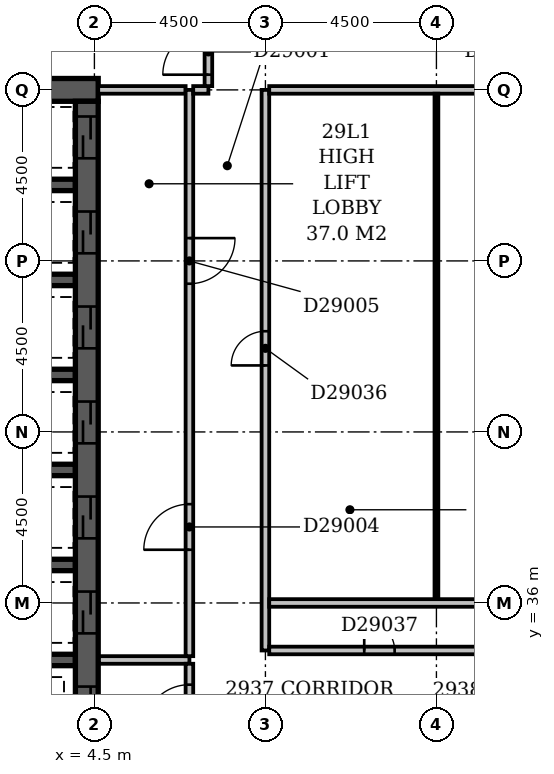
"""IFC4 building model, lengths in metres.
Left out: names, types, materials, properties, quantities, classifications, styles, units other than length and angle.
Written with IfcOpenShell. Run it as: python <this file> out.ifc"""

import sys

from ifc_helpers import new_model, si_unit, direction, frame, frame_2d, origin, place, context, subcontext, project, spatial, rectangle, extrude, element, fill, save


model = new_model("IFC4")
c1 = context("Model", 3, precision=1e-05, world=origin(), true_north=direction((0.0, 1.0)))
c2 = subcontext(c1, "Body", "Model", "MODEL_VIEW")
j1 = project(units=[si_unit("LENGTHUNIT", "METRE"), si_unit("PLANEANGLEUNIT", "RADIAN")], contexts=[c1])
p1 = place(None, origin())
s1 = spatial("IfcSite", under=j1, at=p1, CompositionType="ELEMENT")
p2 = place(p1, origin())
s2 = spatial("IfcBuilding", under=s1, at=p2, CompositionType="ELEMENT")
p3 = place(p2, frame((0.0, 0.0, 119.6)))
s3 = spatial("IfcBuildingStorey", under=s2, at=p3, CompositionType="ELEMENT", Elevation=119.6)
p4 = place(p3, frame((0.2, 49.5, -0.3), z_axis=(0.0, 0.0, 1.0), x_axis=(1.0, 0.0, 0.0)))
e1 = element("IfcWall", 1, at=p4, inside=s3, PredefinedType="SHEAR", context=c2, shape_type="SweptSolid", body=[
    extrude(rectangle(XDim=4.4, YDim=0.6, at=frame_2d((2.2, 0.0))), origin(), (0.0, 0.0, 1.0), 3.6),
])
for number, where, z_axis, x_axis in (
    (2, (0.8, 34.5, -0.3), (0.0, 0.0, 1.0), (1.0, 0.0, 0.0)),
    (3, (0.8, 37.0, -0.3), (0.0, 0.0, 1.0), (1.0, 0.0, 0.0)),
    (4, (0.8, 39.5, -0.3), (0.0, 0.0, 1.0), (1.0, 0.0, 0.0)),
    (5, (0.8, 42.0, -0.3), (0.0, 0.0, 1.0), (1.0, 0.0, 0.0)),
    (6, (0.8, 44.5, -0.3), (0.0, 0.0, 1.0), (1.0, 0.0, 0.0)),
    (7, (0.8, 47.0, -0.3), (0.0, 0.0, 1.0), (1.0, 0.0, 0.0)),
):
    element("IfcWall", number, at=place(p3, frame(where, z_axis=z_axis, x_axis=x_axis)), inside=s3, PredefinedType="SHEAR", context=c2, shape_type="SweptSolid", body=[
        extrude(rectangle(XDim=3.2, YDim=0.3, at=frame_2d((1.6, 0.0))), origin(), (0.0, 0.0, 1.0), 3.6),
    ])
p5 = place(p3, frame((4.3, 27.15, -0.3), z_axis=(0.0, 0.0, 1.0), x_axis=(0.0, 1.0, 0.0)))
e8 = element("IfcWall", 8, at=p5, inside=s3, PredefinedType="SHEAR", context=c2, shape_type="SweptSolid", body=[
    extrude(rectangle(XDim=22.05, YDim=0.6, at=frame_2d((11.025, 0.0))), origin(), (0.0, 0.0, 1.0), 3.6),
])
p6 = place(p5, frame((3.05, 0.0, 0.3)))
e9 = element("IfcOpeningElement", 9, at=p6, cuts=e8, PredefinedType="OPENING", context=c2, shape_type="SweptSolid", body=[
    extrude(rectangle(XDim=1.1, YDim=2.1, at=frame_2d((0.55, 1.05))), frame((0.0, 0.312, 0.0), z_axis=(0.0, -1.0, 0.0), x_axis=(1.0, 0.0, 0.0)), (0.0, 0.0, 1.0), 0.624),
])
p7 = place(p5, frame((0.55, 0.0, 0.3)))
e10 = element("IfcOpeningElement", 10, at=p7, cuts=e8, PredefinedType="OPENING", context=c2, shape_type="SweptSolid", body=[
    extrude(rectangle(XDim=1.1, YDim=2.1, at=frame_2d((0.55, 1.05))), frame((0.0, 0.312, 0.0), z_axis=(0.0, -1.0, 0.0), x_axis=(1.0, 0.0, 0.0)), (0.0, 0.0, 1.0), 0.624),
])
p8 = place(p5, frame((20.55, 0.0, 0.3)))
e11 = element("IfcOpeningElement", 11, at=p8, cuts=e8, PredefinedType="OPENING", context=c2, shape_type="SweptSolid", body=[
    extrude(rectangle(XDim=1.1, YDim=2.1, at=frame_2d((0.55, 1.05))), frame((0.0, 0.312, 0.0), z_axis=(0.0, -1.0, 0.0), x_axis=(1.0, 0.0, 0.0)), (0.0, 0.0, 1.0), 0.624),
])
p9 = place(p5, frame((18.05, 0.0, 0.3)))
e12 = element("IfcOpeningElement", 12, at=p9, cuts=e8, PredefinedType="OPENING", context=c2, shape_type="SweptSolid", body=[
    extrude(rectangle(XDim=1.1, YDim=2.1, at=frame_2d((0.55, 1.05))), frame((0.0, 0.312, 0.0), z_axis=(0.0, -1.0, 0.0), x_axis=(1.0, 0.0, 0.0)), (0.0, 0.0, 1.0), 0.624),
])
p10 = place(p5, frame((15.55, 0.0, 0.3)))
e13 = element("IfcOpeningElement", 13, at=p10, cuts=e8, PredefinedType="OPENING", context=c2, shape_type="SweptSolid", body=[
    extrude(rectangle(XDim=1.1, YDim=2.1, at=frame_2d((0.55, 1.05))), frame((0.0, 0.312, 0.0), z_axis=(0.0, -1.0, 0.0), x_axis=(1.0, 0.0, 0.0)), (0.0, 0.0, 1.0), 0.624),
])
p11 = place(p5, frame((13.05, 0.0, 0.3)))
e14 = element("IfcOpeningElement", 14, at=p11, cuts=e8, PredefinedType="OPENING", context=c2, shape_type="SweptSolid", body=[
    extrude(rectangle(XDim=1.1, YDim=2.1, at=frame_2d((0.55, 1.05))), frame((0.0, 0.312, 0.0), z_axis=(0.0, -1.0, 0.0), x_axis=(1.0, 0.0, 0.0)), (0.0, 0.0, 1.0), 0.624),
])
p12 = place(p5, frame((10.55, 0.0, 0.3)))
e15 = element("IfcOpeningElement", 15, at=p12, cuts=e8, PredefinedType="OPENING", context=c2, shape_type="SweptSolid", body=[
    extrude(rectangle(XDim=1.1, YDim=2.1, at=frame_2d((0.55, 1.05))), frame((0.0, 0.312, 0.0), z_axis=(0.0, -1.0, 0.0), x_axis=(1.0, 0.0, 0.0)), (0.0, 0.0, 1.0), 0.624),
])
p13 = place(p5, frame((8.05, 0.0, 0.3)))
e16 = element("IfcOpeningElement", 16, at=p13, cuts=e8, PredefinedType="OPENING", context=c2, shape_type="SweptSolid", body=[
    extrude(rectangle(XDim=1.1, YDim=2.1, at=frame_2d((0.55, 1.05))), frame((0.0, 0.312, 0.0), z_axis=(0.0, -1.0, 0.0), x_axis=(1.0, 0.0, 0.0)), (0.0, 0.0, 1.0), 0.624),
])
p14 = place(p5, frame((5.55, 0.0, 0.3)))
e17 = element("IfcOpeningElement", 17, at=p14, cuts=e8, PredefinedType="OPENING", context=c2, shape_type="SweptSolid", body=[
    extrude(rectangle(XDim=1.1, YDim=2.1, at=frame_2d((0.55, 1.05))), frame((0.0, 0.312, 0.0), z_axis=(0.0, -1.0, 0.0), x_axis=(1.0, 0.0, 0.0)), (0.0, 0.0, 1.0), 0.624),
])
p15 = place(p3, frame((4.62, 34.5, 0.0), z_axis=(0.0, 0.0, 1.0), x_axis=(1.0, 0.0, 0.0)))
e18 = element("IfcWall", 18, at=p15, inside=s3, PredefinedType="PARTITIONING", context=c2, shape_type="SweptSolid", body=[
    extrude(rectangle(XDim=2.38, YDim=0.2, at=frame_2d((1.19, 0.0))), origin(), (0.0, 0.0, 1.0), 3.3),
])
p16 = place(p3, frame((7.0, 34.6, 0.0), z_axis=(0.0, 0.0, 1.0), x_axis=(0.0, 1.0, 0.0)))
e19 = element("IfcWall", 19, at=p16, inside=s3, PredefinedType="PARTITIONING", context=c2, shape_type="SweptSolid", body=[
    extrude(rectangle(XDim=14.9, YDim=0.2, at=frame_2d((7.45, 0.0))), origin(), (0.0, 0.0, 1.0), 3.3),
])
p17 = place(p16, frame((2.8, 0.0, 0.0)))
e20 = element("IfcOpeningElement", 20, at=p17, cuts=e19, PredefinedType="OPENING", context=c2, shape_type="SweptSolid", body=[
    extrude(rectangle(XDim=1.2, YDim=2.1, at=frame_2d((0.6, 1.05))), frame((0.0, 0.112, 0.0), z_axis=(0.0, -1.0, 0.0), x_axis=(1.0, 0.0, 0.0)), (0.0, 0.0, 1.0), 0.224),
])
p18 = place(p16, frame((9.8, 0.0, 0.0)))
e21 = element("IfcOpeningElement", 21, at=p18, cuts=e19, PredefinedType="OPENING", context=c2, shape_type="SweptSolid", body=[
    extrude(rectangle(XDim=1.2, YDim=2.1, at=frame_2d((0.6, 1.05))), frame((0.0, 0.112, 0.0), z_axis=(0.0, -1.0, 0.0), x_axis=(1.0, 0.0, 0.0)), (0.0, 0.0, 1.0), 0.224),
])
p19 = place(p3, frame((4.6, 49.5, 0.0), z_axis=(0.0, 0.0, 1.0), x_axis=(1.0, 0.0, 0.0)))
e22 = element("IfcWall", 22, at=p19, inside=s3, PredefinedType="PARTITIONING", context=c2, shape_type="SweptSolid", body=[
    extrude(rectangle(XDim=2.3, YDim=0.2, at=frame_2d((1.15, 0.0))), origin(), (0.0, 0.0, 1.0), 3.3),
])
p20 = place(p3, frame((7.0, 32.1, 0.0), z_axis=(0.0, 0.0, 1.0), x_axis=(0.0, 1.0, 0.0)))
e23 = element("IfcWall", 23, at=p20, inside=s3, PredefinedType="PARTITIONING", context=c2, shape_type="SweptSolid", body=[
    extrude(rectangle(XDim=2.3, YDim=0.2, at=frame_2d((1.15, 0.0))), origin(), (0.0, 0.0, 1.0), 3.3),
])
p21 = place(p20, frame((0.55, 0.0, 0.0)))
e24 = element("IfcOpeningElement", 24, at=p21, cuts=e23, PredefinedType="OPENING", context=c2, shape_type="SweptSolid", body=[
    extrude(rectangle(XDim=1.2, YDim=2.1, at=frame_2d((0.6, 1.05))), frame((0.0, 0.112, 0.0), z_axis=(0.0, -1.0, 0.0), x_axis=(1.0, 0.0, 0.0)), (0.0, 0.0, 1.0), 0.224),
])
p22 = place(p3, frame((7.1, 49.5, 0.0), z_axis=(0.0, 0.0, 1.0), x_axis=(1.0, 0.0, 0.0)))
e25 = element("IfcWall", 25, at=p22, inside=s3, PredefinedType="PARTITIONING", context=c2, shape_type="SweptSolid", body=[
    extrude(rectangle(XDim=0.4, YDim=0.2, at=frame_2d((0.2, 0.0))), origin(), (0.0, 0.0, 1.0), 3.3),
])
p23 = place(p3, frame((7.5, 49.6, 0.0), z_axis=(0.0, 0.0, 1.0), x_axis=(0.0, 1.0, 0.0)))
e26 = element("IfcWall", 26, at=p23, inside=s3, PredefinedType="PARTITIONING", context=c2, shape_type="SweptSolid", body=[
    extrude(rectangle(XDim=3.9, YDim=0.2, at=frame_2d((1.95, 0.0))), origin(), (0.0, 0.0, 1.0), 3.3),
])
p24 = place(p23, frame((0.3, 0.0, 0.0)))
e27 = element("IfcOpeningElement", 27, at=p24, cuts=e26, PredefinedType="OPENING", context=c2, shape_type="SweptSolid", body=[
    extrude(rectangle(XDim=1.2, YDim=2.1, at=frame_2d((0.6, 1.05))), frame((0.0, 0.112, 0.0), z_axis=(0.0, -1.0, 0.0), x_axis=(1.0, 0.0, 0.0)), (0.0, 0.0, 1.0), 0.224),
])
p25 = place(p3, frame((9.0, 34.75, 0.0), z_axis=(0.0, 0.0, 1.0), x_axis=(0.0, 1.0, 0.0)))
e28 = element("IfcWall", 28, at=p25, inside=s3, PredefinedType="PARTITIONING", context=c2, shape_type="SweptSolid", body=[
    extrude(rectangle(XDim=14.75, YDim=0.2, at=frame_2d((7.375, 0.0))), origin(), (0.0, 0.0, 1.0), 3.3),
])
p26 = place(p25, frame((7.5, 0.0, 0.0)))
e29 = element("IfcOpeningElement", 29, at=p26, cuts=e28, PredefinedType="OPENING", context=c2, shape_type="SweptSolid", body=[
    extrude(rectangle(XDim=0.9, YDim=2.1, at=frame_2d((0.45, 1.05))), frame((0.0, 0.112, 0.0), z_axis=(0.0, -1.0, 0.0), x_axis=(1.0, 0.0, 0.0)), (0.0, 0.0, 1.0), 0.224),
])
p27 = place(p3, frame((9.1, 34.75, 0.0), z_axis=(0.0, 0.0, 1.0), x_axis=(1.0, 0.0, 0.0)))
e30 = element("IfcWall", 30, at=p27, inside=s3, PredefinedType="PARTITIONING", context=c2, shape_type="SweptSolid", body=[
    extrude(rectangle(XDim=8.85, YDim=0.2, at=frame_2d((4.425, 0.0))), origin(), (0.0, 0.0, 1.0), 3.3),
])
p28 = place(p27, frame((2.5, 0.0, 0.0)))
e31 = element("IfcOpeningElement", 31, at=p28, cuts=e30, PredefinedType="OPENING", context=c2, shape_type="SweptSolid", body=[
    extrude(rectangle(XDim=0.8, YDim=2.1, at=frame_2d((0.4, 1.05))), frame((0.0, 0.112, 0.0), z_axis=(0.0, -1.0, 0.0), x_axis=(1.0, 0.0, 0.0)), (0.0, 0.0, 1.0), 0.224),
])
p29 = place(p3, frame((9.1, 36.0, 0.0), z_axis=(0.0, 0.0, 1.0), x_axis=(1.0, 0.0, 0.0)))
e32 = element("IfcWall", 32, at=p29, inside=s3, PredefinedType="PARTITIONING", context=c2, shape_type="SweptSolid", body=[
    extrude(rectangle(XDim=12.9, YDim=0.2, at=frame_2d((6.45, 0.0))), origin(), (0.0, 0.0, 1.0), 3.3),
])
p30 = place(p3, frame((13.5, 36.1, 0.0), z_axis=(0.0, 0.0, 1.0), x_axis=(0.0, 1.0, 0.0)))
e33 = element("IfcWall", 33, at=p30, inside=s3, PredefinedType="PARTITIONING", context=c2, shape_type="SweptSolid", body=[
    extrude(rectangle(XDim=13.3, YDim=0.1, at=frame_2d((6.65, 0.0))), origin(), (0.0, 0.0, 1.0), 3.3),
])
p31 = place(p3, frame((9.1, 49.5, 0.0), z_axis=(0.0, 0.0, 1.0), x_axis=(1.0, 0.0, 0.0)))
e34 = element("IfcWall", 34, at=p31, inside=s3, PredefinedType="PARTITIONING", context=c2, shape_type="SweptSolid", body=[
    extrude(rectangle(XDim=41.55, YDim=0.2, at=frame_2d((20.775, 0.0))), origin(), (0.0, 0.0, 1.0), 3.3),
])
p32 = place(p31, frame((13.7, 0.0, 0.0)))
e35 = element("IfcOpeningElement", 35, at=p32, cuts=e34, PredefinedType="OPENING", context=c2, shape_type="SweptSolid", body=[
    extrude(rectangle(XDim=1.0, YDim=2.1, at=frame_2d((0.5, 1.05))), frame((0.0, 0.112, 0.0), z_axis=(0.0, -1.0, 0.0), x_axis=(1.0, 0.0, 0.0)), (0.0, 0.0, 1.0), 0.224),
])
p33 = place(p31, frame((27.8, 0.0, 0.0)))
e36 = element("IfcOpeningElement", 36, at=p33, cuts=e34, PredefinedType="OPENING", context=c2, shape_type="SweptSolid", body=[
    extrude(rectangle(XDim=1.0, YDim=2.1, at=frame_2d((0.5, 1.05))), frame((0.0, 0.112, 0.0), z_axis=(0.0, -1.0, 0.0), x_axis=(1.0, 0.0, 0.0)), (0.0, 0.0, 1.0), 0.224),
])
p34 = place(p31, frame((8.4, 0.0, 0.0)))
e37 = element("IfcOpeningElement", 37, at=p34, cuts=e34, PredefinedType="OPENING", context=c2, shape_type="SweptSolid", body=[
    extrude(rectangle(XDim=0.9, YDim=2.1, at=frame_2d((0.45, 1.05))), frame((0.0, 0.112, 0.0), z_axis=(0.0, -1.0, 0.0), x_axis=(1.0, 0.0, 0.0)), (0.0, 0.0, 1.0), 0.224),
])
p35 = place(p24, origin())
e38 = element("IfcDoor", 38, at=p35, inside=s3, OperationType="SINGLE_SWING_LEFT", PredefinedType="DOOR", context=c2, shape_type="SweptSolid", body=[
    extrude(rectangle(XDim=1.2, YDim=2.1, at=frame_2d((0.6, 1.05))), frame((0.0, 0.025, 0.0), z_axis=(0.0, -1.0, 0.0), x_axis=(1.0, 0.0, 0.0)), (0.0, 0.0, 1.0), 0.05),
])
fill(e27, e38)
p36 = place(p8, origin())
e39 = element("IfcDoor", 39, at=p36, inside=s3, OperationType="SLIDING_TO_LEFT", PredefinedType="DOOR", context=c2, shape_type="SweptSolid", body=[
    extrude(rectangle(XDim=1.1, YDim=2.1, at=frame_2d((0.55, 1.05))), frame((0.0, 0.025, 0.0), z_axis=(0.0, -1.0, 0.0), x_axis=(1.0, 0.0, 0.0)), (0.0, 0.0, 1.0), 0.05),
])
fill(e11, e39)
p37 = place(p9, origin())
e40 = element("IfcDoor", 40, at=p37, inside=s3, OperationType="SLIDING_TO_LEFT", PredefinedType="DOOR", context=c2, shape_type="SweptSolid", body=[
    extrude(rectangle(XDim=1.1, YDim=2.1, at=frame_2d((0.55, 1.05))), frame((0.0, 0.025, 0.0), z_axis=(0.0, -1.0, 0.0), x_axis=(1.0, 0.0, 0.0)), (0.0, 0.0, 1.0), 0.05),
])
fill(e12, e40)
p38 = place(p10, origin())
e41 = element("IfcDoor", 41, at=p38, inside=s3, OperationType="SLIDING_TO_LEFT", PredefinedType="DOOR", context=c2, shape_type="SweptSolid", body=[
    extrude(rectangle(XDim=1.1, YDim=2.1, at=frame_2d((0.55, 1.05))), frame((0.0, 0.025, 0.0), z_axis=(0.0, -1.0, 0.0), x_axis=(1.0, 0.0, 0.0)), (0.0, 0.0, 1.0), 0.05),
])
fill(e13, e41)
p39 = place(p11, origin())
e42 = element("IfcDoor", 42, at=p39, inside=s3, OperationType="SLIDING_TO_LEFT", PredefinedType="DOOR", context=c2, shape_type="SweptSolid", body=[
    extrude(rectangle(XDim=1.1, YDim=2.1, at=frame_2d((0.55, 1.05))), frame((0.0, 0.025, 0.0), z_axis=(0.0, -1.0, 0.0), x_axis=(1.0, 0.0, 0.0)), (0.0, 0.0, 1.0), 0.05),
])
fill(e14, e42)
p40 = place(p12, origin())
e43 = element("IfcDoor", 43, at=p40, inside=s3, OperationType="SLIDING_TO_LEFT", PredefinedType="DOOR", context=c2, shape_type="SweptSolid", body=[
    extrude(rectangle(XDim=1.1, YDim=2.1, at=frame_2d((0.55, 1.05))), frame((0.0, 0.025, 0.0), z_axis=(0.0, -1.0, 0.0), x_axis=(1.0, 0.0, 0.0)), (0.0, 0.0, 1.0), 0.05),
])
fill(e15, e43)
p41 = place(p13, origin())
e44 = element("IfcDoor", 44, at=p41, inside=s3, OperationType="SLIDING_TO_LEFT", PredefinedType="DOOR", context=c2, shape_type="SweptSolid", body=[
    extrude(rectangle(XDim=1.1, YDim=2.1, at=frame_2d((0.55, 1.05))), frame((0.0, 0.025, 0.0), z_axis=(0.0, -1.0, 0.0), x_axis=(1.0, 0.0, 0.0)), (0.0, 0.0, 1.0), 0.05),
])
fill(e16, e44)
p42 = place(p17, origin())
e45 = element("IfcDoor", 45, at=p42, inside=s3, OperationType="SINGLE_SWING_LEFT", PredefinedType="DOOR", context=c2, shape_type="SweptSolid", body=[
    extrude(rectangle(XDim=1.2, YDim=2.1, at=frame_2d((0.6, 1.05))), frame((0.0, 0.025, 0.0), z_axis=(0.0, -1.0, 0.0), x_axis=(1.0, 0.0, 0.0)), (0.0, 0.0, 1.0), 0.05),
])
fill(e20, e45)
p43 = place(p18, origin())
e46 = element("IfcDoor", 46, at=p43, inside=s3, OperationType="SINGLE_SWING_RIGHT", PredefinedType="DOOR", context=c2, shape_type="SweptSolid", body=[
    extrude(rectangle(XDim=1.2, YDim=2.1, at=frame_2d((0.6, 1.05))), frame((0.0, 0.025, 0.0), z_axis=(0.0, -1.0, 0.0), x_axis=(1.0, 0.0, 0.0)), (0.0, 0.0, 1.0), 0.05),
])
fill(e21, e46)
p44 = place(p21, origin())
e47 = element("IfcDoor", 47, at=p44, inside=s3, OperationType="SINGLE_SWING_LEFT", PredefinedType="DOOR", context=c2, shape_type="SweptSolid", body=[
    extrude(rectangle(XDim=1.2, YDim=2.1, at=frame_2d((0.6, 1.05))), frame((0.0, 0.025, 0.0), z_axis=(0.0, -1.0, 0.0), x_axis=(1.0, 0.0, 0.0)), (0.0, 0.0, 1.0), 0.05),
])
fill(e24, e47)
p45 = place(p14, origin())
e48 = element("IfcDoor", 48, at=p45, inside=s3, OperationType="SLIDING_TO_LEFT", PredefinedType="DOOR", context=c2, shape_type="SweptSolid", body=[
    extrude(rectangle(XDim=1.1, YDim=2.1, at=frame_2d((0.55, 1.05))), frame((0.0, 0.025, 0.0), z_axis=(0.0, -1.0, 0.0), x_axis=(1.0, 0.0, 0.0)), (0.0, 0.0, 1.0), 0.05),
])
fill(e17, e48)
p46 = place(p26, origin())
e49 = element("IfcDoor", 49, at=p46, inside=s3, OperationType="SINGLE_SWING_LEFT", PredefinedType="DOOR", context=c2, shape_type="SweptSolid", body=[
    extrude(rectangle(XDim=0.9, YDim=2.1, at=frame_2d((0.45, 1.05))), frame((0.0, 0.025, 0.0), z_axis=(0.0, -1.0, 0.0), x_axis=(1.0, 0.0, 0.0)), (0.0, 0.0, 1.0), 0.05),
])
fill(e29, e49)
p47 = place(p28, origin())
e50 = element("IfcDoor", 50, at=p47, inside=s3, OperationType="SINGLE_SWING_LEFT", PredefinedType="DOOR", context=c2, shape_type="SweptSolid", body=[
    extrude(rectangle(XDim=0.8, YDim=2.1, at=frame_2d((0.4, 1.05))), frame((0.0, 0.025, 0.0), z_axis=(0.0, -1.0, 0.0), x_axis=(1.0, 0.0, 0.0)), (0.0, 0.0, 1.0), 0.05),
])
fill(e31, e50)
save(model, sys.argv[1])
